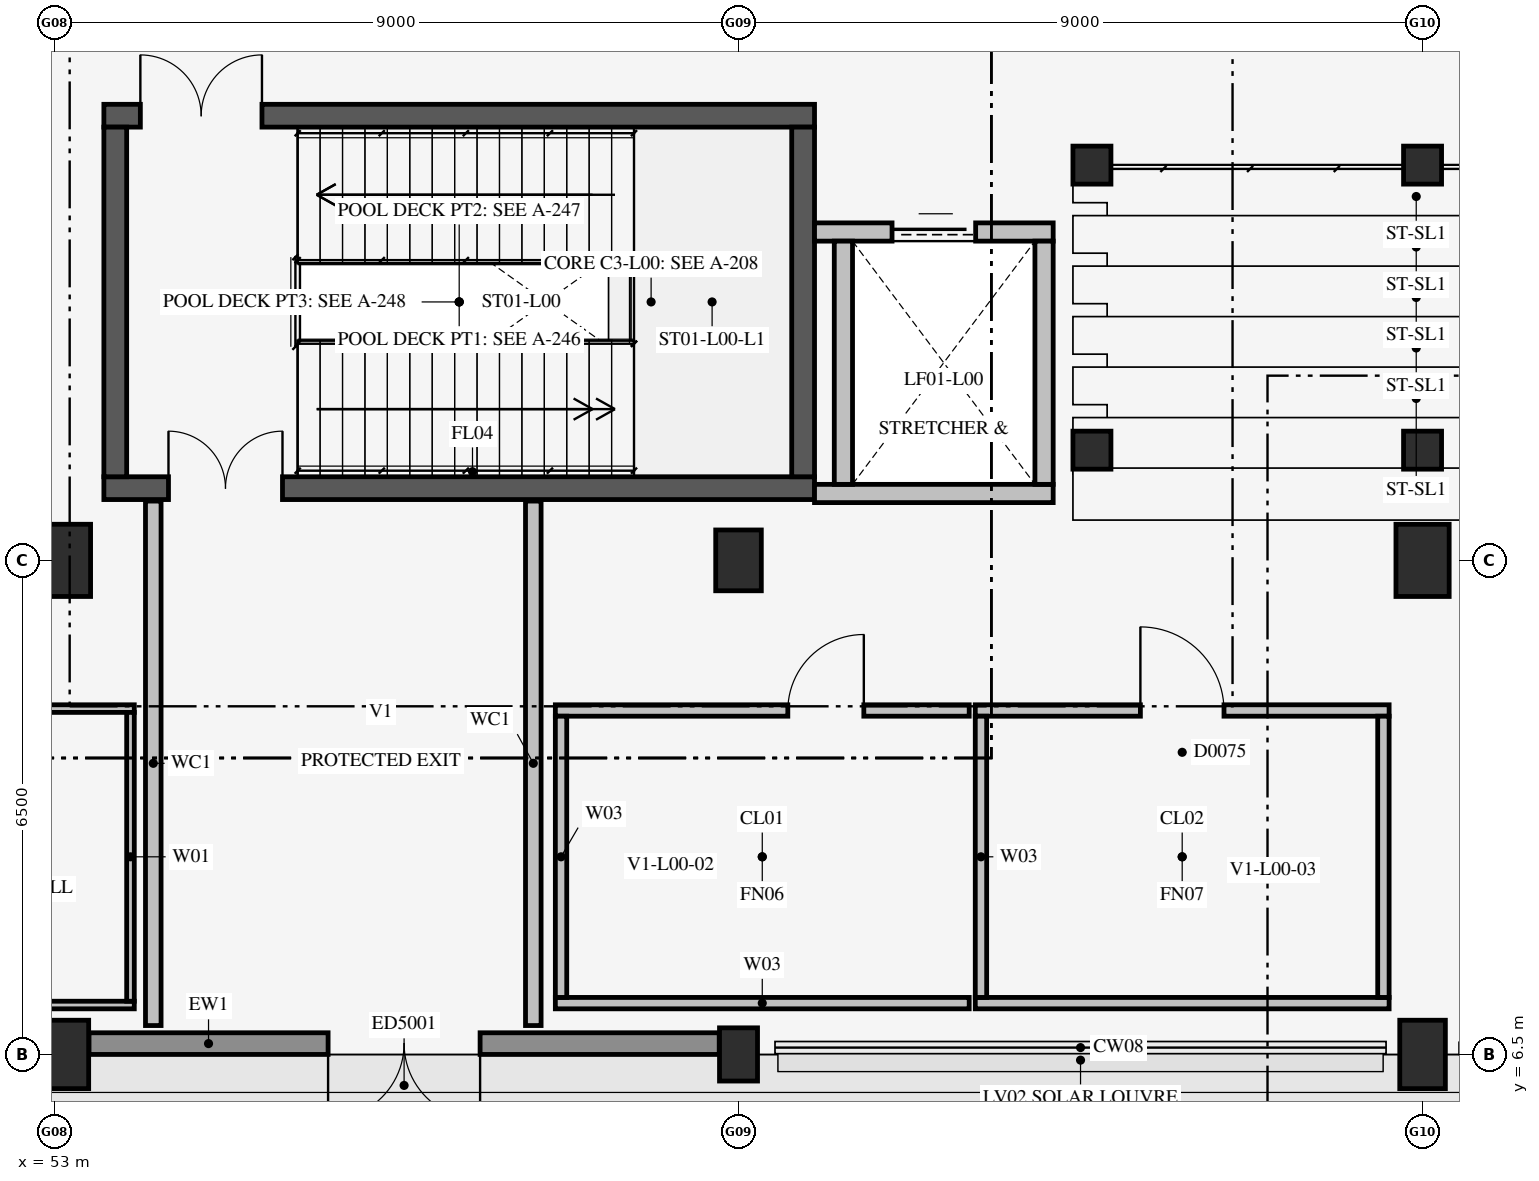
"""IFC4 building model, lengths in metres.
Left out: names, types, materials, properties, quantities, classifications, styles, units other than length and angle.
Written with IfcOpenShell. Run it as: python <this file> out.ifc"""

import sys

from ifc_helpers import new_model, si_unit, direction, frame, frame_2d, origin, origin_2d, place, context, subcontext, project, spatial, rectangle, extrude, element, fill, save


model = new_model("IFC4")
c1 = context("Model", 3, precision=1e-05, world=origin(), true_north=direction((0.0, 1.0)))
c2 = subcontext(c1, "Body", "Model", "MODEL_VIEW")
j1 = project(units=[si_unit("LENGTHUNIT", "METRE"), si_unit("PLANEANGLEUNIT", "RADIAN")], contexts=[c1])
p1 = place(None, origin())
s1 = spatial("IfcSite", under=j1, at=p1, CompositionType="ELEMENT")
p2 = place(p1, origin())
s2 = spatial("IfcBuilding", under=s1, at=p2, CompositionType="ELEMENT")
p3 = place(p2, origin())
s3 = spatial("IfcBuildingStorey", under=s2, at=p3, CompositionType="ELEMENT", Elevation=0.0)
p4 = place(p3, frame((53.65, 13.95, 0.0), z_axis=(0.0, 0.0, 1.0), x_axis=(1.0, 0.0, 0.0)))
e1 = element("IfcWall", 1, at=p4, inside=s3, PredefinedType="SHEAR", context=c2, shape_type="SweptSolid", body=[
    extrude(rectangle(XDim=9.35, YDim=0.3, at=frame_2d((4.675, 0.0))), origin(), (0.0, 0.0, 1.0), 5.14),
])
p5 = place(p4, frame((0.85, 0.0, 0.0)))
e2 = element("IfcOpeningElement", 2, at=p5, cuts=e1, PredefinedType="OPENING", context=c2, shape_type="SweptSolid", body=[
    extrude(rectangle(XDim=1.5, YDim=2.3, at=frame_2d((0.75, 1.15))), frame((0.0, 0.162, 0.0), z_axis=(0.0, -1.0, 0.0), x_axis=(1.0, 0.0, 0.0)), (0.0, 0.0, 1.0), 0.324),
])
p6 = place(p3, frame((53.65, 18.85, 0.0), z_axis=(0.0, 0.0, 1.0), x_axis=(1.0, 0.0, 0.0)))
e3 = element("IfcWall", 3, at=p6, inside=s3, PredefinedType="SHEAR", context=c2, shape_type="SweptSolid", body=[
    extrude(rectangle(XDim=9.35, YDim=0.3, at=frame_2d((4.675, 0.0))), origin(), (0.0, 0.0, 1.0), 5.14),
])
p7 = place(p6, frame((0.48, 0.0, 0.0)))
e4 = element("IfcOpeningElement", 4, at=p7, cuts=e3, PredefinedType="OPENING", context=c2, shape_type="SweptSolid", body=[
    extrude(rectangle(XDim=1.6, YDim=2.2, at=frame_2d((0.8, 1.1))), frame((0.0, 0.162, 0.0), z_axis=(0.0, -1.0, 0.0), x_axis=(1.0, 0.0, 0.0)), (0.0, 0.0, 1.0), 0.324),
])
for number, where, z_axis, x_axis in (
    (5, (53.8, 14.1, 0.0), (0.0, 0.0, 1.0), (0.0, 1.0, 0.0)),
    (6, (62.85, 14.1, 0.0), (0.0, 0.0, 1.0), (0.0, 1.0, 0.0)),
):
    element("IfcWall", number, at=place(p3, frame(where, z_axis=z_axis, x_axis=x_axis)), inside=s3, PredefinedType="SHEAR", context=c2, shape_type="SweptSolid", body=[
        extrude(rectangle(XDim=4.6, YDim=0.3, at=frame_2d((2.3, 0.0))), origin(), (0.0, 0.0, 1.0), 5.14),
    ])
p8 = place(p3, frame((63.0, 13.88, 0.0), z_axis=(0.0, 0.0, 1.0), x_axis=(1.0, 0.0, 0.0)))
e7 = element("IfcWall", 7, at=p8, inside=s3, PredefinedType="SOLIDWALL", context=c2, shape_type="SweptSolid", body=[
    extrude(rectangle(XDim=3.14, YDim=0.24, at=frame_2d((1.57, 0.0))), origin(), (0.0, 0.0, 1.0), 5.4),
])
p9 = place(p3, frame((63.0, 17.32, 0.0), z_axis=(0.0, 0.0, 1.0), x_axis=(1.0, 0.0, 0.0)))
e8 = element("IfcWall", 8, at=p9, inside=s3, PredefinedType="SOLIDWALL", context=c2, shape_type="SweptSolid", body=[
    extrude(rectangle(XDim=3.14, YDim=0.24, at=frame_2d((1.57, 0.0))), origin(), (0.0, 0.0, 1.0), 5.4),
])
p10 = place(p9, frame((1.02, 0.0, 0.0)))
e9 = element("IfcOpeningElement", 9, at=p10, cuts=e8, PredefinedType="OPENING", context=c2, shape_type="SweptSolid", body=[
    extrude(rectangle(XDim=1.1, YDim=2.15, at=frame_2d((0.55, 1.075))), frame((0.0, 0.132, 0.0), z_axis=(0.0, -1.0, 0.0), x_axis=(1.0, 0.0, 0.0)), (0.0, 0.0, 1.0), 0.264),
])
for number, where, z_axis, x_axis in (
    (10, (63.38, 14.0, 0.0), (0.0, 0.0, 1.0), (0.0, 1.0, 0.0)),
    (11, (66.02, 14.0, 0.0), (0.0, 0.0, 1.0), (0.0, 1.0, 0.0)),
):
    element("IfcWall", number, at=place(p3, frame(where, z_axis=z_axis, x_axis=x_axis)), inside=s3, PredefinedType="SOLIDWALL", context=c2, shape_type="SweptSolid", body=[
        extrude(rectangle(XDim=3.2, YDim=0.24, at=frame_2d((1.6, 0.0))), origin(), (0.0, 0.0, 1.0), 5.4),
    ])
p11 = place(p3, frame((53.0, 6.5, 0.0), z_axis=(0.0, 0.0, 1.0), x_axis=(1.0, 0.0, 0.0)))
e12 = element("IfcColumn", 12, at=p11, inside=s3, PredefinedType="COLUMN", context=c2, shape_type="SweptSolid", body=[
    extrude(rectangle(XDim=0.9, YDim=0.9, at=origin_2d()), origin(), (0.0, 0.0, 1.0), 5.4),
])
p12 = place(p3, frame((53.0, 13.0, 0.0), z_axis=(0.0, 0.0, 1.0), x_axis=(1.0, 0.0, 0.0)))
e13 = element("IfcColumn", 13, at=p12, inside=s3, PredefinedType="COLUMN", context=c2, shape_type="SweptSolid", body=[
    extrude(rectangle(XDim=0.95, YDim=0.95, at=origin_2d()), origin(), (0.0, 0.0, 1.0), 5.4),
])
p13 = place(p3, frame((62.0, 6.5, 0.0), z_axis=(0.0, 0.0, 1.0), x_axis=(1.0, 0.0, 0.0)))
e14 = element("IfcColumn", 14, at=p13, inside=s3, PredefinedType="COLUMN", context=c2, shape_type="SweptSolid", body=[
    extrude(rectangle(XDim=0.5, YDim=0.7, at=origin_2d()), origin(), (0.0, 0.0, 1.0), 5.4),
])
p14 = place(p3, frame((62.0, 13.0, 0.0), z_axis=(0.0, 0.0, 1.0), x_axis=(1.0, 0.0, 0.0)))
e15 = element("IfcColumn", 15, at=p14, inside=s3, PredefinedType="COLUMN", context=c2, shape_type="SweptSolid", body=[
    extrude(rectangle(XDim=0.6, YDim=0.8, at=origin_2d()), origin(), (0.0, 0.0, 1.0), 5.4),
])
p15 = place(p3, frame((71.0, 6.5, 0.0), z_axis=(0.0, 0.0, 1.0), x_axis=(1.0, 0.0, 0.0)))
e16 = element("IfcColumn", 16, at=p15, inside=s3, PredefinedType="COLUMN", context=c2, shape_type="SweptSolid", body=[
    extrude(rectangle(XDim=0.6, YDim=0.9, at=origin_2d()), origin(), (0.0, 0.0, 1.0), 5.4),
])
p16 = place(p3, frame((71.0, 13.0, 0.0), z_axis=(0.0, 0.0, 1.0), x_axis=(1.0, 0.0, 0.0)))
e17 = element("IfcColumn", 17, at=p16, inside=s3, PredefinedType="COLUMN", context=c2, shape_type="SweptSolid", body=[
    extrude(rectangle(XDim=0.7, YDim=0.95, at=origin_2d()), origin(), (0.0, 0.0, 1.0), 5.4),
])
p17 = place(p3, frame((66.65, 18.2, 0.0), z_axis=(0.0, 0.0, 1.0), x_axis=(1.0, 0.0, 0.0)))
e18 = element("IfcColumn", 18, at=p17, inside=s3, PredefinedType="COLUMN", context=c2, shape_type="SweptSolid", body=[
    extrude(rectangle(XDim=0.5, YDim=0.5, at=origin_2d()), origin(), (0.0, 0.0, 1.0), 1.35),
])
p18 = place(p3, frame((66.65, 14.45, 0.0), z_axis=(0.0, 0.0, 1.0), x_axis=(1.0, 0.0, 0.0)))
e19 = element("IfcColumn", 19, at=p18, inside=s3, PredefinedType="COLUMN", context=c2, shape_type="SweptSolid", body=[
    extrude(rectangle(XDim=0.5, YDim=0.5, at=origin_2d()), origin(), (0.0, 0.0, 1.0), 4.25),
])
p19 = place(p3, frame((71.0, 18.2, 0.0), z_axis=(0.0, 0.0, 1.0), x_axis=(1.0, 0.0, 0.0)))
e20 = element("IfcColumn", 20, at=p19, inside=s3, PredefinedType="COLUMN", context=c2, shape_type="SweptSolid", body=[
    extrude(rectangle(XDim=0.5, YDim=0.5, at=origin_2d()), origin(), (0.0, 0.0, 1.0), 1.35),
])
p20 = place(p3, frame((71.0, 14.45, 0.0), z_axis=(0.0, 0.0, 1.0), x_axis=(1.0, 0.0, 0.0)))
e21 = element("IfcColumn", 21, at=p20, inside=s3, PredefinedType="COLUMN", context=c2, shape_type="SweptSolid", body=[
    extrude(rectangle(XDim=0.5, YDim=0.5, at=origin_2d()), origin(), (0.0, 0.0, 1.0), 4.25),
])
p21 = place(p3, frame((47.2, 7.15, 0.0), z_axis=(0.0, 0.0, 1.0), x_axis=(1.0, 0.0, 0.0)))
e22 = element("IfcWall", 22, at=p21, inside=s3, PredefinedType="PARTITIONING", context=c2, shape_type="SweptSolid", body=[
    extrude(rectangle(XDim=6.85, YDim=0.1, at=frame_2d((3.425, 0.0))), origin(), (0.0, 0.0, 1.0), 5.125),
])
p22 = place(p3, frame((47.2, 11.05, 0.0), z_axis=(0.0, 0.0, 1.0), x_axis=(1.0, 0.0, 0.0)))
e23 = element("IfcWall", 23, at=p22, inside=s3, PredefinedType="PARTITIONING", context=c2, shape_type="SweptSolid", body=[
    extrude(rectangle(XDim=6.85, YDim=0.1, at=frame_2d((3.425, 0.0))), origin(), (0.0, 0.0, 1.0), 5.125),
])
p23 = place(p22, frame((2.374, 0.0, 0.0)))
e24 = element("IfcOpeningElement", 24, at=p23, cuts=e23, PredefinedType="OPENING", context=c2, shape_type="SweptSolid", body=[
    extrude(rectangle(XDim=0.95, YDim=2.15, at=frame_2d((0.475, 1.075))), frame((0.0, 0.062, 0.0), z_axis=(0.0, -1.0, 0.0), x_axis=(1.0, 0.0, 0.0)), (0.0, 0.0, 1.0), 0.124),
])
p24 = place(p3, frame((54.0, 7.2, 0.0), z_axis=(0.0, 0.0, 1.0), x_axis=(0.0, 1.0, 0.0)))
e25 = element("IfcWall", 25, at=p24, inside=s3, PredefinedType="PARTITIONING", context=c2, shape_type="SweptSolid", body=[
    extrude(rectangle(XDim=3.8, YDim=0.1, at=frame_2d((1.9, 0.0))), origin(), (0.0, 0.0, 1.0), 5.125),
])
p25 = place(p3, frame((59.59, 7.175, 0.0), z_axis=(0.0, 0.0, 1.0), x_axis=(1.0, 0.0, 0.0)))
e26 = element("IfcWall", 26, at=p25, inside=s3, PredefinedType="PARTITIONING", context=c2, shape_type="SweptSolid", body=[
    extrude(rectangle(XDim=5.445, YDim=0.15, at=frame_2d((2.722, 0.0))), origin(), (0.0, 0.0, 1.0), 5.125),
])
p26 = place(p3, frame((59.59, 11.025, 0.0), z_axis=(0.0, 0.0, 1.0), x_axis=(1.0, 0.0, 0.0)))
e27 = element("IfcWall", 27, at=p26, inside=s3, PredefinedType="PARTITIONING", context=c2, shape_type="SweptSolid", body=[
    extrude(rectangle(XDim=5.445, YDim=0.15, at=frame_2d((2.722, 0.0))), origin(), (0.0, 0.0, 1.0), 5.125),
])
p27 = place(p26, frame((3.059, 0.0, 0.0)))
e28 = element("IfcOpeningElement", 28, at=p27, cuts=e27, PredefinedType="OPENING", context=c2, shape_type="SweptSolid", body=[
    extrude(rectangle(XDim=1.0, YDim=2.2, at=frame_2d((0.5, 1.1))), frame((0.0, 0.087, 0.0), z_axis=(0.0, -1.0, 0.0), x_axis=(1.0, 0.0, 0.0)), (0.0, 0.0, 1.0), 0.174),
])
p28 = place(p3, frame((59.665, 7.25, 0.0), z_axis=(0.0, 0.0, 1.0), x_axis=(0.0, 1.0, 0.0)))
e29 = element("IfcWall", 29, at=p28, inside=s3, PredefinedType="PARTITIONING", context=c2, shape_type="SweptSolid", body=[
    extrude(rectangle(XDim=3.7, YDim=0.15, at=frame_2d((1.85, 0.0))), origin(), (0.0, 0.0, 1.0), 5.125),
])
p29 = place(p3, frame((65.115, 7.175, 0.0), z_axis=(0.0, 0.0, 1.0), x_axis=(1.0, 0.0, 0.0)))
e30 = element("IfcWall", 30, at=p29, inside=s3, PredefinedType="PARTITIONING", context=c2, shape_type="SweptSolid", body=[
    extrude(rectangle(XDim=5.445, YDim=0.15, at=frame_2d((2.723, 0.0))), origin(), (0.0, 0.0, 1.0), 5.125),
])
p30 = place(p3, frame((65.115, 11.025, 0.0), z_axis=(0.0, 0.0, 1.0), x_axis=(1.0, 0.0, 0.0)))
e31 = element("IfcWall", 31, at=p30, inside=s3, PredefinedType="PARTITIONING", context=c2, shape_type="SweptSolid", body=[
    extrude(rectangle(XDim=5.445, YDim=0.15, at=frame_2d((2.723, 0.0))), origin(), (0.0, 0.0, 1.0), 5.125),
])
p31 = place(p30, frame((2.173, 0.0, 0.0)))
e32 = element("IfcOpeningElement", 32, at=p31, cuts=e31, PredefinedType="OPENING", context=c2, shape_type="SweptSolid", body=[
    extrude(rectangle(XDim=1.1, YDim=2.25, at=frame_2d((0.55, 1.125))), frame((0.0, 0.087, 0.0), z_axis=(0.0, -1.0, 0.0), x_axis=(1.0, 0.0, 0.0)), (0.0, 0.0, 1.0), 0.174),
])
for number, where, z_axis, x_axis in (
    (33, (70.485, 7.25, 0.0), (0.0, 0.0, 1.0), (0.0, 1.0, 0.0)),
    (34, (65.19, 7.25, 0.0), (0.0, 0.0, 1.0), (0.0, 1.0, 0.0)),
):
    element("IfcWall", number, at=place(p3, frame(where, z_axis=z_axis, x_axis=x_axis)), inside=s3, PredefinedType="PARTITIONING", context=c2, shape_type="SweptSolid", body=[
        extrude(rectangle(XDim=3.7, YDim=0.15, at=frame_2d((1.85, 0.0))), origin(), (0.0, 0.0, 1.0), 5.125),
    ])
for number, where, z_axis, x_axis in (
    (35, (54.3, 6.88, 0.0), (0.0, 0.0, 1.0), (0.0, 1.0, 0.0)),
    (36, (59.3, 6.88, 0.0), (0.0, 0.0, 1.0), (0.0, 1.0, 0.0)),
):
    element("IfcWall", number, at=place(p3, frame(where, z_axis=z_axis, x_axis=x_axis)), inside=s3, PredefinedType="SOLIDWALL", context=c2, shape_type="SweptSolid", body=[
        extrude(rectangle(XDim=6.9, YDim=0.205, at=frame_2d((3.45, 0.0))), origin(), (0.0, 0.0, 1.0), 5.14),
    ])
p32 = place(p3, frame((53.454, 6.643, 0.0), z_axis=(0.0, 0.0, 1.0), x_axis=(1.0, 0.0, 0.0)))
e37 = element("IfcWall", 37, at=p32, inside=s3, PredefinedType="SOLIDWALL", context=c2, shape_type="SweptSolid", body=[
    extrude(rectangle(XDim=8.292, YDim=0.285, at=frame_2d((4.146, 0.0))), origin(), (0.0, 0.0, 1.0), 4.382),
])
p33 = place(p32, frame((3.146, 0.0, 0.0)))
e38 = element("IfcOpeningElement", 38, at=p33, cuts=e37, PredefinedType="OPENING", context=c2, shape_type="SweptSolid", body=[
    extrude(rectangle(XDim=2.0, YDim=2.4, at=frame_2d((1.0, 1.2))), frame((0.0, 0.154, 0.0), z_axis=(0.0, -1.0, 0.0), x_axis=(1.0, 0.0, 0.0)), (0.0, 0.0, 1.0), 0.309),
])
p34 = place(p7, origin())
e39 = element("IfcDoor", 39, at=p34, inside=s3, OperationType="DOUBLE_DOOR_SINGLE_SWING", PredefinedType="DOOR", context=c2, shape_type="SweptSolid", body=[
    extrude(rectangle(XDim=1.6, YDim=2.2, at=frame_2d((0.8, 1.1))), frame((0.0, 0.025, 0.0), z_axis=(0.0, -1.0, 0.0), x_axis=(1.0, 0.0, 0.0)), (0.0, 0.0, 1.0), 0.05),
])
fill(e4, e39)
p35 = place(p5, frame((1.5, 0.0, 0.0), z_axis=(0.0, 0.0, 1.0), x_axis=(-1.0, 0.0, 0.0)))
e40 = element("IfcDoor", 40, at=p35, inside=s3, OperationType="DOUBLE_DOOR_SINGLE_SWING", PredefinedType="DOOR", context=c2, shape_type="SweptSolid", body=[
    extrude(rectangle(XDim=1.5, YDim=2.3, at=frame_2d((0.75, 1.15))), frame((0.0, 0.025, 0.0), z_axis=(0.0, -1.0, 0.0), x_axis=(1.0, 0.0, 0.0)), (0.0, 0.0, 1.0), 0.05),
])
fill(e2, e40)
p36 = place(p27, frame((1.0, 0.0, 0.0), z_axis=(0.0, 0.0, 1.0), x_axis=(-1.0, 0.0, 0.0)))
e41 = element("IfcDoor", 41, at=p36, inside=s3, OperationType="SINGLE_SWING_RIGHT", PredefinedType="DOOR", context=c2, shape_type="SweptSolid", body=[
    extrude(rectangle(XDim=1.0, YDim=2.2, at=frame_2d((0.5, 1.1))), frame((0.0, 0.025, 0.0), z_axis=(0.0, -1.0, 0.0), x_axis=(1.0, 0.0, 0.0)), (0.0, 0.0, 1.0), 0.05),
])
fill(e28, e41)
p37 = place(p31, frame((1.1, 0.0, 0.0), z_axis=(0.0, 0.0, 1.0), x_axis=(-1.0, 0.0, 0.0)))
e42 = element("IfcDoor", 42, at=p37, inside=s3, OperationType="SINGLE_SWING_LEFT", PredefinedType="DOOR", context=c2, shape_type="SweptSolid", body=[
    extrude(rectangle(XDim=1.1, YDim=2.25, at=frame_2d((0.55, 1.125))), frame((0.0, 0.025, 0.0), z_axis=(0.0, -1.0, 0.0), x_axis=(1.0, 0.0, 0.0)), (0.0, 0.0, 1.0), 0.05),
])
fill(e32, e42)
p38 = place(p33, frame((2.0, 0.0, 0.0), z_axis=(0.0, 0.0, 1.0), x_axis=(-1.0, 0.0, 0.0)))
e43 = element("IfcDoor", 43, at=p38, inside=s3, OperationType="DOUBLE_DOOR_SINGLE_SWING", PredefinedType="DOOR", context=c2, shape_type="SweptSolid", body=[
    extrude(rectangle(XDim=2.0, YDim=2.4, at=frame_2d((1.0, 1.2))), frame((0.0, 0.025, 0.0), z_axis=(0.0, -1.0, 0.0), x_axis=(1.0, 0.0, 0.0)), (0.0, 0.0, 1.0), 0.05),
])
fill(e38, e43)
p39 = place(p10, origin())
e44 = element("IfcDoor", 44, at=p39, inside=s3, OperationType="SLIDING_TO_RIGHT", PredefinedType="USERDEFINED", context=c2, shape_type="SweptSolid", body=[
    extrude(rectangle(XDim=1.1, YDim=2.15, at=frame_2d((0.55, 1.075))), frame((0.0, 0.025, 0.0), z_axis=(0.0, -1.0, 0.0), x_axis=(1.0, 0.0, 0.0)), (0.0, 0.0, 1.0), 0.05),
])
fill(e9, e44)
save(model, sys.argv[1])
